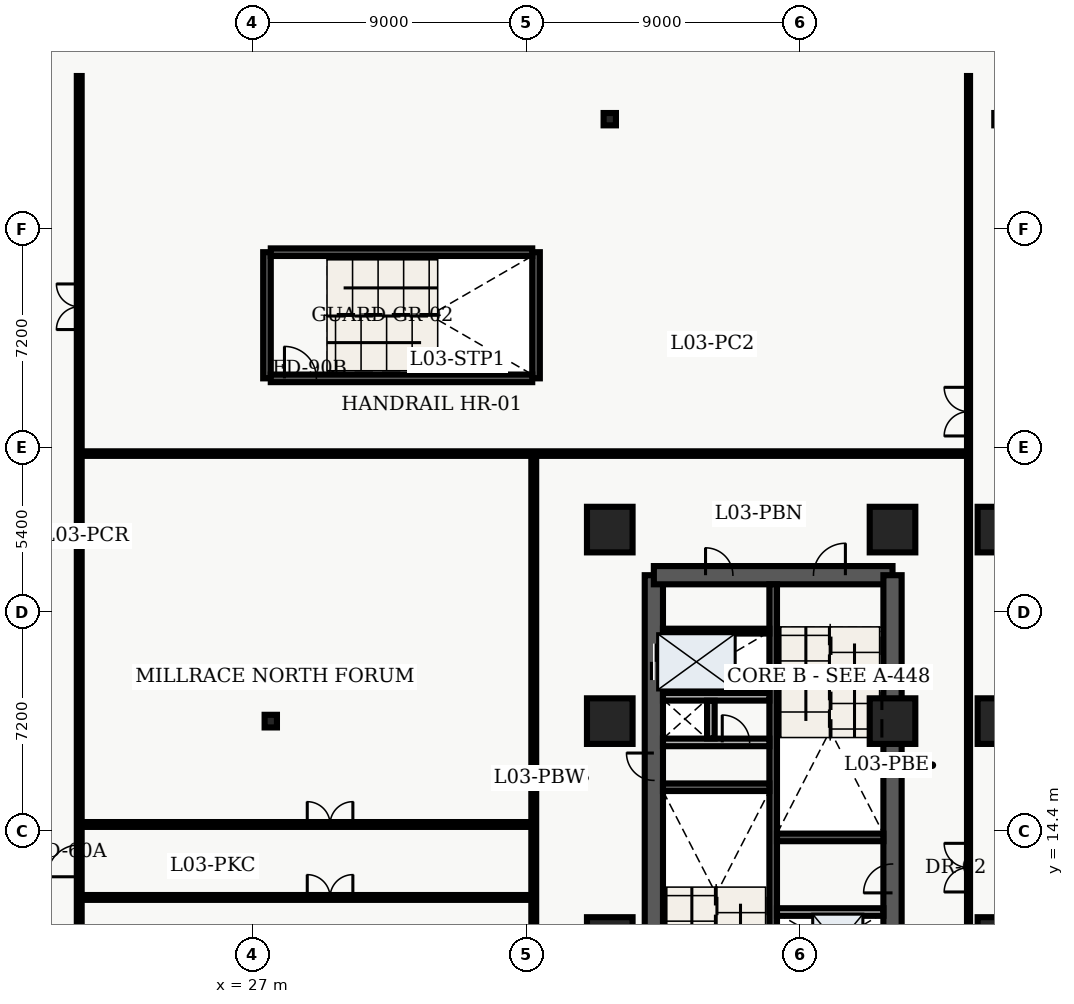
"""IFC4 building model, lengths in metres.
Left out: names, types, materials, properties, quantities, classifications, styles, units other than length and angle.
Written with IfcOpenShell. Run it as: python <this file> out.ifc"""

import sys

from ifc_helpers import new_model, entity, si_unit, converted_unit, direction, frame, origin_with_axes, origin_2d_with_axis, place, context, subcontext, project, spatial, polyline, rectangle, hollow_rectangle, i_section, outline, extrude, element, fill, save


model = new_model("IFC4")
c1 = context("Model", 3, precision=1e-05, world=origin_with_axes(), true_north=direction((0.0, 1.0)))
c2 = subcontext(c1, "Body", "Model", "MODEL_VIEW")
j1 = project(units=[si_unit("LENGTHUNIT", "METRE"), converted_unit("PLANEANGLEUNIT", "DEGREE", entity("IfcPlaneAngleMeasure", 0.017), si_unit("PLANEANGLEUNIT", "RADIAN"), dimensions=[0, 0, 0, 0, 0, 0, 0])], contexts=[c1])
p1 = place(None, origin_with_axes())
s1 = spatial("IfcSite", under=j1, at=p1, CompositionType="ELEMENT")
p2 = place(p1, origin_with_axes())
s2 = spatial("IfcBuilding", under=s1, at=p2, CompositionType="ELEMENT")
p3 = place(p2, frame((0.0, 0.0, 15.3), z_axis=(0.0, 0.0, 1.0), x_axis=(1.0, 0.0, 0.0)))
s3 = spatial("IfcBuildingStorey", under=s2, at=p3, CompositionType="ELEMENT", Elevation=15.3)
p4 = place(p3, frame((40.2, 7.2, 0.0), z_axis=(0.0, 0.0, 1.0), x_axis=(0.0, 1.0, 0.0)))
e1 = element("IfcWall", 1, at=p4, inside=s3, PredefinedType="SHEAR", context=c2, shape_type="SweptSolid", body=[
    extrude(outline(polyline([(0.0, -0.3), (15.6, -0.3), (15.6, 0.3), (0.0, 0.3), (0.0, -0.3)])), origin_with_axes(), (0.0, 0.0, 1.0), 4.26),
])
p5 = place(p4, frame((12.75, 0.0, 0.0), z_axis=(0.0, 0.0, 1.0), x_axis=(1.0, 0.0, 0.0)))
e2 = element("IfcOpeningElement", 2, at=p5, cuts=e1, PredefinedType="OPENING", context=c2, shape_type="SweptSolid", body=[
    extrude(rectangle(XDim=1.2, YDim=0.62, at=origin_2d_with_axis()), origin_with_axes(), (0.0, 0.0, 1.0), 2.15),
])
p6 = place(p4, frame((9.3, 0.0, 0.0), z_axis=(0.0, 0.0, 1.0), x_axis=(1.0, 0.0, 0.0)))
e3 = element("IfcOpeningElement", 3, at=p6, cuts=e1, PredefinedType="OPENING", context=c2, shape_type="SweptSolid", body=[
    extrude(rectangle(XDim=0.9, YDim=0.62, at=origin_2d_with_axis()), origin_with_axes(), (0.0, 0.0, 1.0), 2.15),
])
p7 = place(p3, frame((40.2, 22.8, 0.0), z_axis=(0.0, 0.0, 1.0), x_axis=(1.0, 0.0, 0.0)))
e4 = element("IfcWall", 4, at=p7, inside=s3, PredefinedType="SHEAR", context=c2, shape_type="SweptSolid", body=[
    extrude(outline(polyline([(0.0, -0.3), (7.85, -0.3), (7.85, 0.3), (0.0, 0.3), (0.0, -0.3)])), origin_with_axes(), (0.0, 0.0, 1.0), 4.26),
])
p8 = place(p7, frame((5.775, 0.0, 0.0), z_axis=(0.0, 0.0, 1.0), x_axis=(1.0, 0.0, 0.0)))
e5 = element("IfcOpeningElement", 5, at=p8, cuts=e4, PredefinedType="OPENING", context=c2, shape_type="SweptSolid", body=[
    extrude(rectangle(XDim=1.05, YDim=0.62, at=origin_2d_with_axis()), origin_with_axes(), (0.0, 0.0, 1.0), 2.15),
])
p9 = place(p7, frame((2.15, 0.0, 0.0), z_axis=(0.0, 0.0, 1.0), x_axis=(1.0, 0.0, 0.0)))
e6 = element("IfcOpeningElement", 6, at=p9, cuts=e4, PredefinedType="OPENING", context=c2, shape_type="SweptSolid", body=[
    extrude(rectangle(XDim=0.9, YDim=0.62, at=origin_2d_with_axis()), origin_with_axes(), (0.0, 0.0, 1.0), 2.15),
])
p10 = place(p3, frame((48.05, 7.2, 0.0), z_axis=(0.0, 0.0, 1.0), x_axis=(0.0, 1.0, 0.0)))
e7 = element("IfcWall", 7, at=p10, inside=s3, PredefinedType="SHEAR", context=c2, shape_type="SweptSolid", body=[
    extrude(outline(polyline([(0.0, -0.3), (15.6, -0.3), (15.6, 0.3), (0.0, 0.3), (0.0, -0.3)])), origin_with_axes(), (0.0, 0.0, 1.0), 4.26),
])
p11 = place(p10, frame((1.425, 0.0, 0.0), z_axis=(0.0, 0.0, 1.0), x_axis=(1.0, 0.0, 0.0)))
e8 = element("IfcOpeningElement", 8, at=p11, cuts=e7, PredefinedType="OPENING", context=c2, shape_type="SweptSolid", body=[
    extrude(rectangle(XDim=1.05, YDim=0.62, at=origin_2d_with_axis()), origin_with_axes(), (0.0, 0.0, 1.0), 2.15),
])
p12 = place(p10, frame((3.475, 0.0, 0.0), z_axis=(0.0, 0.0, 1.0), x_axis=(1.0, 0.0, 0.0)))
e9 = element("IfcOpeningElement", 9, at=p12, cuts=e7, PredefinedType="OPENING", context=c2, shape_type="SweptSolid", body=[
    extrude(rectangle(XDim=1.05, YDim=0.62, at=origin_2d_with_axis()), origin_with_axes(), (0.0, 0.0, 1.0), 2.15),
])
p13 = place(p10, frame((5.625, 0.0, 0.0), z_axis=(0.0, 0.0, 1.0), x_axis=(1.0, 0.0, 0.0)))
e10 = element("IfcOpeningElement", 10, at=p13, cuts=e7, PredefinedType="OPENING", context=c2, shape_type="SweptSolid", body=[
    extrude(rectangle(XDim=0.95, YDim=0.62, at=origin_2d_with_axis()), origin_with_axes(), (0.0, 0.0, 1.0), 2.15),
])
p14 = place(p3, frame((44.125, 7.5, 0.0), z_axis=(0.0, 0.0, 1.0), x_axis=(0.0, 1.0, 0.0)))
e11 = element("IfcWall", 11, at=p14, inside=s3, PredefinedType="SHEAR", context=c2, shape_type="SweptSolid", body=[
    extrude(outline(polyline([(0.0, -0.125), (15.0, -0.125), (15.0, 0.125), (0.0, 0.125), (0.0, -0.125)])), origin_with_axes(), (0.0, 0.0, 1.0), 4.26),
])
for number, where, z_axis, x_axis in (
    (12, (40.5, 15.825, 0.0), (0.0, 0.0, 1.0), (1.0, 0.0, 0.0)),
    (13, (44.25, 14.175, 0.0), (0.0, 0.0, 1.0), (1.0, 0.0, 0.0)),
):
    element("IfcWall", number, at=place(p3, frame(where, z_axis=z_axis, x_axis=x_axis)), inside=s3, PredefinedType="SHEAR", context=c2, shape_type="SweptSolid", body=[
        extrude(outline(polyline([(0.0, -0.125), (3.5, -0.125), (3.5, 0.125), (0.0, 0.125), (0.0, -0.125)])), origin_with_axes(), (0.0, 0.0, 1.0), 4.26),
    ])
p15 = place(p3, frame((40.5, 17.3, 0.0), z_axis=(0.0, 0.0, 1.0), x_axis=(1.0, 0.0, 0.0)))
e14 = element("IfcWall", 14, at=p15, inside=s3, PredefinedType="SOLIDWALL", context=c2, shape_type="SweptSolid", body=[
    extrude(outline(polyline([(0.0, -0.125), (3.5, -0.125), (3.5, 0.125), (0.0, 0.125), (0.0, -0.125)])), origin_with_axes(), (0.0, 0.0, 1.0), 3.3),
])
p16 = place(p15, frame((2.4, 0.0, 0.0), z_axis=(0.0, 0.0, 1.0), x_axis=(1.0, 0.0, 0.0)))
e15 = element("IfcOpeningElement", 15, at=p16, cuts=e14, PredefinedType="OPENING", context=c2, shape_type="SweptSolid", body=[
    extrude(rectangle(XDim=0.9, YDim=0.27, at=origin_2d_with_axis()), origin_with_axes(), (0.0, 0.0, 1.0), 2.15),
])
p17 = place(p3, frame((40.5, 18.8, 0.0), z_axis=(0.0, 0.0, 1.0), x_axis=(1.0, 0.0, 0.0)))
e16 = element("IfcWall", 16, at=p17, inside=s3, PredefinedType="SOLIDWALL", context=c2, shape_type="SweptSolid", body=[
    extrude(outline(polyline([(0.0, -0.125), (3.5, -0.125), (3.5, 0.125), (0.0, 0.125), (0.0, -0.125)])), origin_with_axes(), (0.0, 0.0, 1.0), 3.3),
])
p18 = place(p3, frame((42.075, 17.43, 0.0), z_axis=(0.0, 0.0, 1.0), x_axis=(0.0, 1.0, 0.0)))
e17 = element("IfcWall", 17, at=p18, inside=s3, PredefinedType="SOLIDWALL", context=c2, shape_type="SweptSolid", body=[
    extrude(outline(polyline([(0.0, -0.125), (1.24, -0.125), (1.24, 0.125), (0.0, 0.125), (0.0, -0.125)])), origin_with_axes(), (0.0, 0.0, 1.0), 3.3),
])
for number, where, z_axis, x_axis in (
    (18, (27.475, 29.275, 0.0), (0.0, 0.0, 1.0), (0.0, 1.0, 0.0)),
    (19, (36.325, 29.275, 0.0), (0.0, 0.0, 1.0), (0.0, 1.0, 0.0)),
):
    element("IfcWall", number, at=place(p3, frame(where, z_axis=z_axis, x_axis=x_axis)), inside=s3, PredefinedType="SHEAR", context=c2, shape_type="SweptSolid", body=[
        extrude(outline(polyline([(0.0, -0.125), (4.15, -0.125), (4.15, 0.125), (0.0, 0.125), (0.0, -0.125)])), origin_with_axes(), (0.0, 0.0, 1.0), 4.26),
    ])
p19 = place(p3, frame((27.6, 29.275, 0.0), z_axis=(0.0, 0.0, 1.0), x_axis=(1.0, 0.0, 0.0)))
e20 = element("IfcWall", 20, at=p19, inside=s3, PredefinedType="SHEAR", context=c2, shape_type="SweptSolid", body=[
    extrude(outline(polyline([(0.0, -0.125), (8.6, -0.125), (8.6, 0.125), (0.0, 0.125), (0.0, -0.125)])), origin_with_axes(), (0.0, 0.0, 1.0), 4.26),
])
p20 = place(p19, frame((0.975, 0.0, 0.0), z_axis=(0.0, 0.0, 1.0), x_axis=(1.0, 0.0, 0.0)))
e21 = element("IfcOpeningElement", 21, at=p20, cuts=e20, PredefinedType="OPENING", context=c2, shape_type="SweptSolid", body=[
    extrude(rectangle(XDim=1.05, YDim=0.27, at=origin_2d_with_axis()), origin_with_axes(), (0.0, 0.0, 1.0), 2.15),
])
p21 = place(p3, frame((27.6, 33.425, 0.0), z_axis=(0.0, 0.0, 1.0), x_axis=(1.0, 0.0, 0.0)))
e22 = element("IfcWall", 22, at=p21, inside=s3, PredefinedType="SHEAR", context=c2, shape_type="SweptSolid", body=[
    extrude(outline(polyline([(0.0, -0.125), (8.6, -0.125), (8.6, 0.125), (0.0, 0.125), (0.0, -0.125)])), origin_with_axes(), (0.0, 0.0, 1.0), 4.26),
])
p22 = place(p3, frame((27.6, 18.0, 0.0), z_axis=(0.0, 0.0, 1.0), x_axis=(1.0, 0.0, 0.0)))
e23 = element("IfcColumn", 23, at=p22, inside=s3, PredefinedType="COLUMN", context=c2, shape_type="SweptSolid", body=[
    extrude(i_section(OverallWidth=0.406, OverallDepth=0.416, WebThickness=0.03, FlangeThickness=0.048, FilletRadius=0.022, at=origin_2d_with_axis()), origin_with_axes(), (0.0, 0.0, 1.0), 4.5),
])
for number, where, z_axis, x_axis in (
    (24, (38.75, 10.8, 0.0), (0.0, 0.0, 1.0), (1.0, 0.0, 0.0)),
    (25, (38.75, 18.0, 0.0), (0.0, 0.0, 1.0), (1.0, 0.0, 0.0)),
    (26, (38.75, 24.3, 0.0), (0.0, 0.0, 1.0), (1.0, 0.0, 0.0)),
    (27, (48.05, 18.0, 0.0), (0.0, 0.0, 1.0), (1.0, 0.0, 0.0)),
    (28, (48.05, 24.3, 0.0), (0.0, 0.0, 1.0), (1.0, 0.0, 0.0)),
    (29, (51.6, 10.8, 0.0), (0.0, 0.0, 1.0), (1.0, 0.0, 0.0)),
    (30, (51.6, 18.0, 0.0), (0.0, 0.0, 1.0), (1.0, 0.0, 0.0)),
    (31, (51.6, 24.3, 0.0), (0.0, 0.0, 1.0), (1.0, 0.0, 0.0)),
):
    element("IfcColumn", number, at=place(p3, frame(where, z_axis=z_axis, x_axis=x_axis)), inside=s3, PredefinedType="COLUMN", context=c2, shape_type="SweptSolid", body=[
        extrude(rectangle(XDim=1.5, YDim=1.5, at=origin_2d_with_axis()), origin_with_axes(), (0.0, 0.0, 1.0), 4.5),
    ])
p23 = place(p3, frame((38.75, 37.8, 0.0), z_axis=(0.0, 0.0, 1.0), x_axis=(1.0, 0.0, 0.0)))
e32 = element("IfcColumn", 32, at=p23, inside=s3, PredefinedType="COLUMN", context=c2, shape_type="SweptSolid", body=[
    extrude(hollow_rectangle(XDim=0.406, YDim=0.406, WallThickness=0.015, InnerFilletRadius=0.015, OuterFilletRadius=0.03, at=origin_2d_with_axis()), origin_with_axes(), (0.0, 0.0, 1.0), 4.5),
])
p24 = place(p3, frame((51.6, 37.8, 0.0), z_axis=(0.0, 0.0, 1.0), x_axis=(1.0, 0.0, 0.0)))
e33 = element("IfcColumn", 33, at=p24, inside=s3, PredefinedType="COLUMN", context=c2, shape_type="SweptSolid", body=[
    extrude(hollow_rectangle(XDim=0.406, YDim=0.406, WallThickness=0.015, InnerFilletRadius=0.015, OuterFilletRadius=0.03, at=origin_2d_with_axis()), origin_with_axes(), (0.0, 0.0, 1.0), 4.392),
])
p25 = place(p3, frame((40.5, 20.96, 0.0), z_axis=(0.0, 0.0, 1.0), x_axis=(1.0, 0.0, 0.0)))
e34 = element("IfcWall", 34, at=p25, inside=s3, PredefinedType="PARTITIONING", context=c2, shape_type="SweptSolid", body=[
    extrude(outline(polyline([(0.0, -0.08), (3.5, -0.08), (3.5, 0.08), (0.0, 0.08), (0.0, -0.08)])), origin_with_axes(), (0.0, 0.0, 1.0), 3.2),
])
p26 = place(p3, frame((44.25, 11.72, 0.0), z_axis=(0.0, 0.0, 1.0), x_axis=(1.0, 0.0, 0.0)))
e35 = element("IfcWall", 35, at=p26, inside=s3, PredefinedType="SOLIDWALL", context=c2, shape_type="SweptSolid", body=[
    extrude(outline(polyline([(0.0, -0.125), (3.5, -0.125), (3.5, 0.125), (0.0, 0.125), (0.0, -0.125)])), origin_with_axes(), (0.0, 0.0, 1.0), 3.2),
])
p27 = place(p3, frame((21.3, 0.38, 0.0), z_axis=(0.0, 0.0, 1.0), x_axis=(0.0, 1.0, 0.0)))
e36 = element("IfcWall", 36, at=p27, inside=s3, PredefinedType="PARTITIONING", context=c2, shape_type="SweptSolid", body=[
    extrude(outline(polyline([(0.0, -0.08), (38.84, -0.08), (38.84, 0.08), (0.0, 0.08), (0.0, -0.08)])), origin_with_axes(), (0.0, 0.0, 1.0), 3.2),
])
p28 = place(p27, frame((13.025, 0.0, 0.0), z_axis=(0.0, 0.0, 1.0), x_axis=(1.0, 0.0, 0.0)))
e37 = element("IfcOpeningElement", 37, at=p28, cuts=e36, PredefinedType="OPENING", context=c2, shape_type="SweptSolid", body=[
    extrude(rectangle(XDim=1.05, YDim=0.18, at=origin_2d_with_axis()), origin_with_axes(), (0.0, 0.0, 1.0), 2.15),
])
p29 = place(p27, frame((31.25, 0.0, 0.0), z_axis=(0.0, 0.0, 1.0), x_axis=(1.0, 0.0, 0.0)))
e38 = element("IfcOpeningElement", 38, at=p29, cuts=e36, PredefinedType="OPENING", context=c2, shape_type="SweptSolid", body=[
    extrude(rectangle(XDim=1.5, YDim=0.18, at=origin_2d_with_axis()), origin_with_axes(), (0.0, 0.0, 1.0), 2.2),
])
p30 = place(p3, frame((21.3, 12.2, 0.0), z_axis=(0.0, 0.0, 1.0), x_axis=(1.0, 0.0, 0.0)))
e39 = element("IfcWall", 39, at=p30, inside=s3, PredefinedType="PARTITIONING", context=c2, shape_type="SweptSolid", body=[
    extrude(outline(polyline([(0.0, -0.08), (14.95, -0.08), (14.95, 0.08), (0.0, 0.08), (0.0, -0.08)])), origin_with_axes(), (0.0, 0.0, 1.0), 3.2),
])
p31 = place(p30, frame((8.25, 0.0, 0.0), z_axis=(0.0, 0.0, 1.0), x_axis=(1.0, 0.0, 0.0)))
e40 = element("IfcOpeningElement", 40, at=p31, cuts=e39, PredefinedType="OPENING", context=c2, shape_type="SweptSolid", body=[
    extrude(rectangle(XDim=1.5, YDim=0.18, at=origin_2d_with_axis()), origin_with_axes(), (0.0, 0.0, 1.0), 2.2),
])
p32 = place(p3, frame((21.3, 14.6, 0.0), z_axis=(0.0, 0.0, 1.0), x_axis=(1.0, 0.0, 0.0)))
e41 = element("IfcWall", 41, at=p32, inside=s3, PredefinedType="PARTITIONING", context=c2, shape_type="SweptSolid", body=[
    extrude(outline(polyline([(0.0, -0.08), (14.95, -0.08), (14.95, 0.08), (0.0, 0.08), (0.0, -0.08)])), origin_with_axes(), (0.0, 0.0, 1.0), 3.2),
])
p33 = place(p32, frame((8.25, 0.0, 0.0), z_axis=(0.0, 0.0, 1.0), x_axis=(1.0, 0.0, 0.0)))
e42 = element("IfcOpeningElement", 42, at=p33, cuts=e41, PredefinedType="OPENING", context=c2, shape_type="SweptSolid", body=[
    extrude(rectangle(XDim=1.5, YDim=0.18, at=origin_2d_with_axis()), origin_with_axes(), (0.0, 0.0, 1.0), 2.2),
])
p34 = place(p3, frame((36.25, 4.3, 0.0), z_axis=(0.0, 0.0, 1.0), x_axis=(0.0, 1.0, 0.0)))
e43 = element("IfcWall", 43, at=p34, inside=s3, PredefinedType="PARTITIONING", context=c2, shape_type="SweptSolid", body=[
    extrude(outline(polyline([(0.0, -0.08), (22.5, -0.08), (22.5, 0.08), (0.0, 0.08), (0.0, -0.08)])), origin_with_axes(), (0.0, 0.0, 1.0), 3.2),
])
p35 = place(p3, frame((50.55, 0.38, 0.0), z_axis=(0.0, 0.0, 1.0), x_axis=(0.0, 1.0, 0.0)))
e44 = element("IfcWall", 44, at=p35, inside=s3, PredefinedType="PARTITIONING", context=c2, shape_type="SweptSolid", body=[
    extrude(outline(polyline([(0.0, -0.05), (38.84, -0.05), (38.84, 0.05), (0.0, 0.05), (0.0, -0.05)])), origin_with_axes(), (0.0, 0.0, 1.0), 3.2),
])
p36 = place(p35, frame((12.8, 0.0, 0.0), z_axis=(0.0, 0.0, 1.0), x_axis=(1.0, 0.0, 0.0)))
e45 = element("IfcOpeningElement", 45, at=p36, cuts=e44, PredefinedType="OPENING", context=c2, shape_type="SweptSolid", body=[
    extrude(rectangle(XDim=1.6, YDim=0.12, at=origin_2d_with_axis()), origin_with_axes(), (0.0, 0.0, 1.0), 2.2),
])
p37 = place(p35, frame((27.8, 0.0, 0.0), z_axis=(0.0, 0.0, 1.0), x_axis=(1.0, 0.0, 0.0)))
e46 = element("IfcOpeningElement", 46, at=p37, cuts=e44, PredefinedType="OPENING", context=c2, shape_type="SweptSolid", body=[
    extrude(rectangle(XDim=1.6, YDim=0.12, at=origin_2d_with_axis()), origin_with_axes(), (0.0, 0.0, 1.0), 2.2),
])
p38 = place(p3, frame((21.3, 26.8, 0.0), z_axis=(0.0, 0.0, 1.0), x_axis=(1.0, 0.0, 0.0)))
e47 = element("IfcWall", 47, at=p38, inside=s3, PredefinedType="PARTITIONING", context=c2, shape_type="SweptSolid", body=[
    extrude(outline(polyline([(0.0, -0.075), (29.25, -0.075), (29.25, 0.075), (0.0, 0.075), (0.0, -0.075)])), origin_with_axes(), (0.0, 0.0, 1.0), 3.2),
])
p39 = place(p4, frame((12.75, 0.0, 0.0), z_axis=(0.0, 0.0, 1.0), x_axis=(1.0, 0.0, 0.0)))
e48 = element("IfcDoor", 48, at=p39, inside=s3, OperationType="DOUBLE_DOOR_SLIDING", PredefinedType="DOOR", context=c2, shape_type="SweptSolid", body=[
    extrude(rectangle(XDim=1.2, YDim=0.09, at=origin_2d_with_axis()), origin_with_axes(), (0.0, 0.0, 1.0), 2.15),
])
fill(e2, e48)
p40 = place(p4, frame((9.3, 0.0, 0.0), z_axis=(0.0, 0.0, 1.0), x_axis=(1.0, 0.0, 0.0)))
e49 = element("IfcDoor", 49, at=p40, inside=s3, OperationType="SINGLE_SWING_RIGHT", PredefinedType="DOOR", context=c2, shape_type="SweptSolid", body=[
    extrude(rectangle(XDim=0.9, YDim=0.09, at=origin_2d_with_axis()), origin_with_axes(), (0.0, 0.0, 1.0), 2.15),
])
fill(e3, e49)
p41 = place(p15, frame((2.4, 0.0, 0.0), z_axis=(0.0, 0.0, 1.0), x_axis=(1.0, 0.0, 0.0)))
e50 = element("IfcDoor", 50, at=p41, inside=s3, OperationType="SINGLE_SWING_LEFT", PredefinedType="DOOR", context=c2, shape_type="SweptSolid", body=[
    extrude(rectangle(XDim=0.9, YDim=0.09, at=origin_2d_with_axis()), origin_with_axes(), (0.0, 0.0, 1.0), 2.15),
])
fill(e15, e50)
p42 = place(p7, frame((5.775, 0.0, 0.0), z_axis=(0.0, 0.0, 1.0), x_axis=(1.0, 0.0, 0.0)))
e51 = element("IfcDoor", 51, at=p42, inside=s3, OperationType="SINGLE_SWING_RIGHT", PredefinedType="DOOR", context=c2, shape_type="SweptSolid", body=[
    extrude(rectangle(XDim=1.05, YDim=0.09, at=origin_2d_with_axis()), origin_with_axes(), (0.0, 0.0, 1.0), 2.15),
])
fill(e5, e51)
p43 = place(p7, frame((2.15, 0.0, 0.0), z_axis=(0.0, 0.0, 1.0), x_axis=(1.0, 0.0, 0.0)))
e52 = element("IfcDoor", 52, at=p43, inside=s3, OperationType="SINGLE_SWING_LEFT", PredefinedType="DOOR", context=c2, shape_type="SweptSolid", body=[
    extrude(rectangle(XDim=0.9, YDim=0.09, at=origin_2d_with_axis()), origin_with_axes(), (0.0, 0.0, 1.0), 2.15),
])
fill(e6, e52)
p44 = place(p10, frame((5.625, 0.0, 0.0), z_axis=(0.0, 0.0, 1.0), x_axis=(1.0, 0.0, 0.0)))
e53 = element("IfcDoor", 53, at=p44, inside=s3, OperationType="SINGLE_SWING_LEFT", PredefinedType="DOOR", context=c2, shape_type="SweptSolid", body=[
    extrude(rectangle(XDim=0.95, YDim=0.09, at=origin_2d_with_axis()), origin_with_axes(), (0.0, 0.0, 1.0), 2.15),
])
fill(e10, e53)
p45 = place(p19, frame((0.975, 0.0, 0.0), z_axis=(0.0, 0.0, 1.0), x_axis=(1.0, 0.0, 0.0)))
e54 = element("IfcDoor", 54, at=p45, inside=s3, OperationType="SINGLE_SWING_LEFT", PredefinedType="DOOR", context=c2, shape_type="SweptSolid", body=[
    extrude(rectangle(XDim=1.05, YDim=0.09, at=origin_2d_with_axis()), origin_with_axes(), (0.0, 0.0, 1.0), 2.15),
])
fill(e21, e54)
p46 = place(p27, frame((13.025, 0.0, 0.0), z_axis=(0.0, 0.0, 1.0), x_axis=(1.0, 0.0, 0.0)))
e55 = element("IfcDoor", 55, at=p46, inside=s3, OperationType="SINGLE_SWING_LEFT", PredefinedType="DOOR", context=c2, shape_type="SweptSolid", body=[
    extrude(rectangle(XDim=1.05, YDim=0.09, at=origin_2d_with_axis()), origin_with_axes(), (0.0, 0.0, 1.0), 2.15),
])
fill(e37, e55)
p47 = place(p30, frame((8.25, 0.0, 0.0), z_axis=(0.0, 0.0, 1.0), x_axis=(1.0, 0.0, 0.0)))
e56 = element("IfcDoor", 56, at=p47, inside=s3, OperationType="DOUBLE_DOOR_SINGLE_SWING", PredefinedType="DOOR", context=c2, shape_type="SweptSolid", body=[
    extrude(rectangle(XDim=1.5, YDim=0.09, at=origin_2d_with_axis()), origin_with_axes(), (0.0, 0.0, 1.0), 2.2),
])
fill(e40, e56)
p48 = place(p32, frame((8.25, 0.0, 0.0), z_axis=(0.0, 0.0, 1.0), x_axis=(1.0, 0.0, 0.0)))
e57 = element("IfcDoor", 57, at=p48, inside=s3, OperationType="DOUBLE_DOOR_SINGLE_SWING", PredefinedType="DOOR", context=c2, shape_type="SweptSolid", body=[
    extrude(rectangle(XDim=1.5, YDim=0.09, at=origin_2d_with_axis()), origin_with_axes(), (0.0, 0.0, 1.0), 2.2),
])
fill(e42, e57)
p49 = place(p27, frame((31.25, 0.0, 0.0), z_axis=(0.0, 0.0, 1.0), x_axis=(1.0, 0.0, 0.0)))
e58 = element("IfcDoor", 58, at=p49, inside=s3, OperationType="DOUBLE_DOOR_SINGLE_SWING", PredefinedType="DOOR", context=c2, shape_type="SweptSolid", body=[
    extrude(rectangle(XDim=1.5, YDim=0.09, at=origin_2d_with_axis()), origin_with_axes(), (0.0, 0.0, 1.0), 2.2),
])
fill(e38, e58)
p50 = place(p35, frame((12.8, 0.0, 0.0), z_axis=(0.0, 0.0, 1.0), x_axis=(1.0, 0.0, 0.0)))
e59 = element("IfcDoor", 59, at=p50, inside=s3, OperationType="DOUBLE_DOOR_SINGLE_SWING", PredefinedType="DOOR", context=c2, shape_type="SweptSolid", body=[
    extrude(rectangle(XDim=1.6, YDim=0.06, at=origin_2d_with_axis()), origin_with_axes(), (0.0, 0.0, 1.0), 2.2),
])
fill(e45, e59)
p51 = place(p35, frame((27.8, 0.0, 0.0), z_axis=(0.0, 0.0, 1.0), x_axis=(1.0, 0.0, 0.0)))
e60 = element("IfcDoor", 60, at=p51, inside=s3, OperationType="DOUBLE_DOOR_SINGLE_SWING", PredefinedType="DOOR", context=c2, shape_type="SweptSolid", body=[
    extrude(rectangle(XDim=1.6, YDim=0.06, at=origin_2d_with_axis()), origin_with_axes(), (0.0, 0.0, 1.0), 2.2),
])
fill(e46, e60)
save(model, sys.argv[1])
